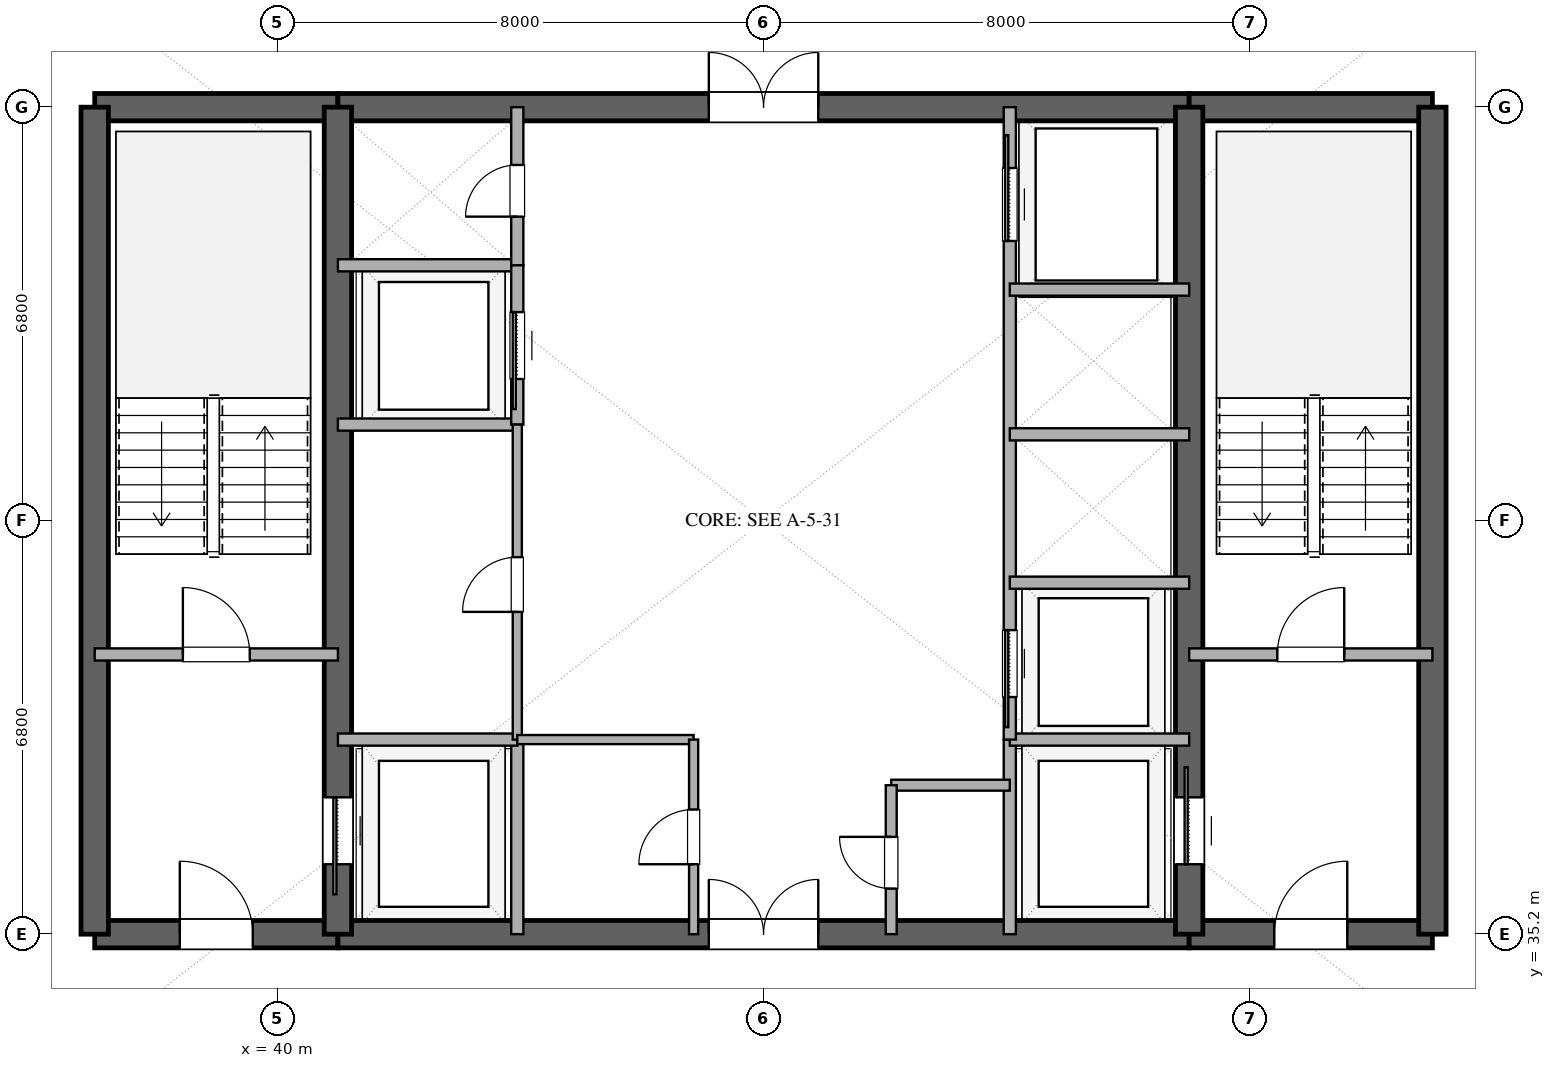
"""IFC4 building model, lengths in metres.
Left out: names, types, materials, properties, quantities, classifications, styles, units other than length and angle.
Written with IfcOpenShell. Run it as: python <this file> out.ifc"""

import sys

from ifc_helpers import new_model, si_unit, direction, frame, frame_2d, origin, place, context, subcontext, project, spatial, rectangle, extrude, element, fill, save


model = new_model("IFC4")
c1 = context("Model", 3, precision=1e-05, world=origin(), true_north=direction((0.0, 1.0)))
c2 = subcontext(c1, "Body", "Model", "MODEL_VIEW")
j1 = project(units=[si_unit("LENGTHUNIT", "METRE"), si_unit("PLANEANGLEUNIT", "RADIAN")], contexts=[c1])
p1 = place(None, origin())
s1 = spatial("IfcSite", under=j1, at=p1, CompositionType="ELEMENT")
p2 = place(p1, origin())
s2 = spatial("IfcBuilding", under=s1, at=p2, CompositionType="ELEMENT")
p3 = place(p2, frame((0.0, 0.0, 206.4)))
s3 = spatial("IfcBuildingStorey", under=s2, at=p3, CompositionType="ELEMENT", Elevation=206.4)
p4 = place(p3, frame((37.0, 35.2, 0.0), z_axis=(0.0, 0.0, 1.0), x_axis=(1.0, 0.0, 0.0)))
e1 = element("IfcWall", 1, at=p4, inside=s3, PredefinedType="SHEAR", context=c2, shape_type="SweptSolid", body=[
    extrude(rectangle(XDim=4.0, YDim=0.45, at=frame_2d((2.0, 0.0))), origin(), (0.0, 0.0, 1.0), 3.36),
])
p5 = place(p4, frame((1.4, 0.0, 0.0)))
e2 = element("IfcOpeningElement", 2, at=p5, cuts=e1, PredefinedType="OPENING", context=c2, shape_type="SweptSolid", body=[
    extrude(rectangle(XDim=1.2, YDim=2.15, at=frame_2d((0.6, 1.075))), frame((0.0, 0.235, 0.0), z_axis=(0.0, -1.0, 0.0), x_axis=(1.0, 0.0, 0.0)), (0.0, 0.0, 1.0), 0.47),
])
p6 = place(p3, frame((41.0, 35.2, 0.0), z_axis=(0.0, 0.0, 1.0), x_axis=(1.0, 0.0, 0.0)))
e3 = element("IfcWall", 3, at=p6, inside=s3, PredefinedType="SHEAR", context=c2, shape_type="SweptSolid", body=[
    extrude(rectangle(XDim=14.0, YDim=0.45, at=frame_2d((7.0, 0.0))), origin(), (0.0, 0.0, 1.0), 3.36),
])
p7 = place(p6, frame((6.1, 0.0, 0.0)))
e4 = element("IfcOpeningElement", 4, at=p7, cuts=e3, PredefinedType="OPENING", context=c2, shape_type="SweptSolid", body=[
    extrude(rectangle(XDim=1.8, YDim=2.25, at=frame_2d((0.9, 1.125))), frame((0.0, 0.235, 0.0), z_axis=(0.0, -1.0, 0.0), x_axis=(1.0, 0.0, 0.0)), (0.0, 0.0, 1.0), 0.47),
])
p8 = place(p3, frame((55.0, 35.2, 0.0), z_axis=(0.0, 0.0, 1.0), x_axis=(1.0, 0.0, 0.0)))
e5 = element("IfcWall", 5, at=p8, inside=s3, PredefinedType="SHEAR", context=c2, shape_type="SweptSolid", body=[
    extrude(rectangle(XDim=4.0, YDim=0.45, at=frame_2d((2.0, 0.0))), origin(), (0.0, 0.0, 1.0), 3.36),
])
p9 = place(p8, frame((1.4, 0.0, 0.0)))
e6 = element("IfcOpeningElement", 6, at=p9, cuts=e5, PredefinedType="OPENING", context=c2, shape_type="SweptSolid", body=[
    extrude(rectangle(XDim=1.2, YDim=2.15, at=frame_2d((0.6, 1.075))), frame((0.0, 0.235, 0.0), z_axis=(0.0, -1.0, 0.0), x_axis=(1.0, 0.0, 0.0)), (0.0, 0.0, 1.0), 0.47),
])
p10 = place(p3, frame((37.0, 48.8, 0.0), z_axis=(0.0, 0.0, 1.0), x_axis=(1.0, 0.0, 0.0)))
e7 = element("IfcWall", 7, at=p10, inside=s3, PredefinedType="SHEAR", context=c2, shape_type="SweptSolid", body=[
    extrude(rectangle(XDim=4.0, YDim=0.45, at=frame_2d((2.0, 0.0))), origin(), (0.0, 0.0, 1.0), 3.36),
])
p11 = place(p3, frame((41.0, 48.8, 0.0), z_axis=(0.0, 0.0, 1.0), x_axis=(1.0, 0.0, 0.0)))
e8 = element("IfcWall", 8, at=p11, inside=s3, PredefinedType="SHEAR", context=c2, shape_type="SweptSolid", body=[
    extrude(rectangle(XDim=14.0, YDim=0.45, at=frame_2d((7.0, 0.0))), origin(), (0.0, 0.0, 1.0), 3.36),
])
p12 = place(p11, frame((6.1, 0.0, 0.0)))
e9 = element("IfcOpeningElement", 9, at=p12, cuts=e8, PredefinedType="OPENING", context=c2, shape_type="SweptSolid", body=[
    extrude(rectangle(XDim=1.8, YDim=2.25, at=frame_2d((0.9, 1.125))), frame((0.0, 0.235, 0.0), z_axis=(0.0, -1.0, 0.0), x_axis=(1.0, 0.0, 0.0)), (0.0, 0.0, 1.0), 0.47),
])
p13 = place(p3, frame((55.0, 48.8, 0.0), z_axis=(0.0, 0.0, 1.0), x_axis=(1.0, 0.0, 0.0)))
e10 = element("IfcWall", 10, at=p13, inside=s3, PredefinedType="SHEAR", context=c2, shape_type="SweptSolid", body=[
    extrude(rectangle(XDim=4.0, YDim=0.45, at=frame_2d((2.0, 0.0))), origin(), (0.0, 0.0, 1.0), 3.36),
])
for number, where, z_axis, x_axis in (
    (11, (37.0, 35.2, 0.0), (0.0, 0.0, 1.0), (0.0, 1.0, 0.0)),
    (12, (59.0, 35.2, 0.0), (0.0, 0.0, 1.0), (0.0, 1.0, 0.0)),
):
    element("IfcWall", number, at=place(p3, frame(where, z_axis=z_axis, x_axis=x_axis)), inside=s3, PredefinedType="SHEAR", context=c2, shape_type="SweptSolid", body=[
        extrude(rectangle(XDim=13.6, YDim=0.45, at=frame_2d((6.8, 0.0))), origin(), (0.0, 0.0, 1.0), 3.36),
    ])
p14 = place(p3, frame((41.0, 35.2, 0.0), z_axis=(0.0, 0.0, 1.0), x_axis=(0.0, 1.0, 0.0)))
e13 = element("IfcWall", 13, at=p14, inside=s3, PredefinedType="SHEAR", context=c2, shape_type="SweptSolid", body=[
    extrude(rectangle(XDim=13.6, YDim=0.45, at=frame_2d((6.8, 0.0))), origin(), (0.0, 0.0, 1.0), 3.36),
])
p15 = place(p14, frame((1.15, 0.0, 0.0)))
e14 = element("IfcOpeningElement", 14, at=p15, cuts=e13, PredefinedType="OPENING", context=c2, shape_type="SweptSolid", body=[
    extrude(rectangle(XDim=1.1, YDim=2.2, at=frame_2d((0.55, 1.1))), frame((0.0, 0.235, 0.0), z_axis=(0.0, -1.0, 0.0), x_axis=(1.0, 0.0, 0.0)), (0.0, 0.0, 1.0), 0.47),
])
p16 = place(p3, frame((55.0, 35.2, 0.0), z_axis=(0.0, 0.0, 1.0), x_axis=(0.0, 1.0, 0.0)))
e15 = element("IfcWall", 15, at=p16, inside=s3, PredefinedType="SHEAR", context=c2, shape_type="SweptSolid", body=[
    extrude(rectangle(XDim=13.6, YDim=0.45, at=frame_2d((6.8, 0.0))), origin(), (0.0, 0.0, 1.0), 3.36),
])
p17 = place(p16, frame((1.15, 0.0, 0.0)))
e16 = element("IfcOpeningElement", 16, at=p17, cuts=e15, PredefinedType="OPENING", context=c2, shape_type="SweptSolid", body=[
    extrude(rectangle(XDim=1.1, YDim=2.2, at=frame_2d((0.55, 1.1))), frame((0.0, 0.235, 0.0), z_axis=(0.0, -1.0, 0.0), x_axis=(1.0, 0.0, 0.0)), (0.0, 0.0, 1.0), 0.47),
])
p18 = place(p3, frame((37.0, 39.8, 0.0), z_axis=(0.0, 0.0, 1.0), x_axis=(1.0, 0.0, 0.0)))
e17 = element("IfcWall", 17, at=p18, inside=s3, PredefinedType="SOLIDWALL", context=c2, shape_type="SweptSolid", body=[
    extrude(rectangle(XDim=4.0, YDim=0.2, at=frame_2d((2.0, 0.0))), origin(), (0.0, 0.0, 1.0), 2.72),
])
p19 = place(p18, frame((1.45, 0.0, 0.0)))
e18 = element("IfcOpeningElement", 18, at=p19, cuts=e17, PredefinedType="OPENING", context=c2, shape_type="SweptSolid", body=[
    extrude(rectangle(XDim=1.1, YDim=2.15, at=frame_2d((0.55, 1.075))), frame((0.0, 0.11, 0.0), z_axis=(0.0, -1.0, 0.0), x_axis=(1.0, 0.0, 0.0)), (0.0, 0.0, 1.0), 0.22),
])
p20 = place(p3, frame((55.0, 39.8, 0.0), z_axis=(0.0, 0.0, 1.0), x_axis=(1.0, 0.0, 0.0)))
e19 = element("IfcWall", 19, at=p20, inside=s3, PredefinedType="SOLIDWALL", context=c2, shape_type="SweptSolid", body=[
    extrude(rectangle(XDim=4.0, YDim=0.2, at=frame_2d((2.0, 0.0))), origin(), (0.0, 0.0, 1.0), 2.72),
])
p21 = place(p20, frame((1.45, 0.0, 0.0)))
e20 = element("IfcOpeningElement", 20, at=p21, cuts=e19, PredefinedType="OPENING", context=c2, shape_type="SweptSolid", body=[
    extrude(rectangle(XDim=1.1, YDim=2.15, at=frame_2d((0.55, 1.075))), frame((0.0, 0.11, 0.0), z_axis=(0.0, -1.0, 0.0), x_axis=(1.0, 0.0, 0.0)), (0.0, 0.0, 1.0), 0.22),
])
p22 = place(p3, frame((43.95, 35.2, 0.0), z_axis=(0.0, 0.0, 1.0), x_axis=(0.0, 1.0, 0.0)))
e21 = element("IfcWall", 21, at=p22, inside=s3, PredefinedType="SOLIDWALL", context=c2, shape_type="SweptSolid", body=[
    extrude(rectangle(XDim=3.2, YDim=0.2, at=frame_2d((1.6, 0.0))), origin(), (0.0, 0.0, 1.0), 2.72),
])
p23 = place(p3, frame((41.0, 38.4, 0.0), z_axis=(0.0, 0.0, 1.0), x_axis=(1.0, 0.0, 0.0)))
e22 = element("IfcWall", 22, at=p23, inside=s3, PredefinedType="SOLIDWALL", context=c2, shape_type="SweptSolid", body=[
    extrude(rectangle(XDim=2.95, YDim=0.2, at=frame_2d((1.475, 0.0))), origin(), (0.0, 0.0, 1.0), 2.72),
])
p24 = place(p3, frame((52.05, 35.2, 0.0), z_axis=(0.0, 0.0, 1.0), x_axis=(0.0, 1.0, 0.0)))
e23 = element("IfcWall", 23, at=p24, inside=s3, PredefinedType="SOLIDWALL", context=c2, shape_type="SweptSolid", body=[
    extrude(rectangle(XDim=3.2, YDim=0.2, at=frame_2d((1.6, 0.0))), origin(), (0.0, 0.0, 1.0), 2.72),
])
for number, where, z_axis, x_axis in (
    (24, (52.05, 38.4, 0.0), (0.0, 0.0, 1.0), (1.0, 0.0, 0.0)),
    (25, (41.0, 46.2, 0.0), (0.0, 0.0, 1.0), (1.0, 0.0, 0.0)),
):
    element("IfcWall", number, at=place(p3, frame(where, z_axis=z_axis, x_axis=x_axis)), inside=s3, PredefinedType="SOLIDWALL", context=c2, shape_type="SweptSolid", body=[
        extrude(rectangle(XDim=2.95, YDim=0.2, at=frame_2d((1.475, 0.0))), origin(), (0.0, 0.0, 1.0), 2.72),
    ])
p25 = place(p3, frame((43.95, 46.2, 0.0), z_axis=(0.0, 0.0, 1.0), x_axis=(0.0, 1.0, 0.0)))
e26 = element("IfcWall", 26, at=p25, inside=s3, PredefinedType="SOLIDWALL", context=c2, shape_type="SweptSolid", body=[
    extrude(rectangle(XDim=2.6, YDim=0.2, at=frame_2d((1.3, 0.0))), origin(), (0.0, 0.0, 1.0), 2.72),
])
p26 = place(p25, frame((0.8, 0.0, 0.0)))
e27 = element("IfcOpeningElement", 27, at=p26, cuts=e26, PredefinedType="OPENING", context=c2, shape_type="SweptSolid", body=[
    extrude(rectangle(XDim=0.85, YDim=2.15, at=frame_2d((0.425, 1.075))), frame((0.0, 0.11, 0.0), z_axis=(0.0, -1.0, 0.0), x_axis=(1.0, 0.0, 0.0)), (0.0, 0.0, 1.0), 0.22),
])
p27 = place(p3, frame((41.0, 43.58, 0.0), z_axis=(0.0, 0.0, 1.0), x_axis=(1.0, 0.0, 0.0)))
e28 = element("IfcWall", 28, at=p27, inside=s3, PredefinedType="SOLIDWALL", context=c2, shape_type="SweptSolid", body=[
    extrude(rectangle(XDim=2.95, YDim=0.2, at=frame_2d((1.475, 0.0))), origin(), (0.0, 0.0, 1.0), 2.72),
])
p28 = place(p3, frame((43.95, 43.58, 0.0), z_axis=(0.0, 0.0, 1.0), x_axis=(0.0, 1.0, 0.0)))
e29 = element("IfcWall", 29, at=p28, inside=s3, PredefinedType="SOLIDWALL", context=c2, shape_type="SweptSolid", body=[
    extrude(rectangle(XDim=2.62, YDim=0.2, at=frame_2d((1.31, 0.0))), origin(), (0.0, 0.0, 1.0), 2.72),
])
p29 = place(p28, frame((0.75, 0.0, 0.0)))
e30 = element("IfcOpeningElement", 30, at=p29, cuts=e29, PredefinedType="OPENING", context=c2, shape_type="SweptSolid", body=[
    extrude(rectangle(XDim=1.1, YDim=2.2, at=frame_2d((0.55, 1.1))), frame((0.0, 0.11, 0.0), z_axis=(0.0, -1.0, 0.0), x_axis=(1.0, 0.0, 0.0)), (0.0, 0.0, 1.0), 0.22),
])
p30 = place(p3, frame((43.95, 38.4, 0.0), z_axis=(0.0, 0.0, 1.0), x_axis=(0.0, 1.0, 0.0)))
e31 = element("IfcWall", 31, at=p30, inside=s3, PredefinedType="PARTITIONING", context=c2, shape_type="SweptSolid", body=[
    extrude(rectangle(XDim=5.18, YDim=0.15, at=frame_2d((2.59, 0.0))), origin(), (0.0, 0.0, 1.0), 2.72),
])
p31 = place(p30, frame((2.1, 0.0, 0.0)))
e32 = element("IfcOpeningElement", 32, at=p31, cuts=e31, PredefinedType="OPENING", context=c2, shape_type="SweptSolid", body=[
    extrude(rectangle(XDim=0.9, YDim=2.15, at=frame_2d((0.45, 1.075))), frame((0.0, 0.085, 0.0), z_axis=(0.0, -1.0, 0.0), x_axis=(1.0, 0.0, 0.0)), (0.0, 0.0, 1.0), 0.17),
])
p32 = place(p3, frame((52.05, 38.4, 0.0), z_axis=(0.0, 0.0, 1.0), x_axis=(0.0, 1.0, 0.0)))
e33 = element("IfcWall", 33, at=p32, inside=s3, PredefinedType="SOLIDWALL", context=c2, shape_type="SweptSolid", body=[
    extrude(rectangle(XDim=10.4, YDim=0.2, at=frame_2d((5.2, 0.0))), origin(), (0.0, 0.0, 1.0), 2.72),
])
p33 = place(p32, frame((0.7, 0.0, 0.0)))
e34 = element("IfcOpeningElement", 34, at=p33, cuts=e33, PredefinedType="OPENING", context=c2, shape_type="SweptSolid", body=[
    extrude(rectangle(XDim=1.1, YDim=2.2, at=frame_2d((0.55, 1.1))), frame((0.0, 0.11, 0.0), z_axis=(0.0, -1.0, 0.0), x_axis=(1.0, 0.0, 0.0)), (0.0, 0.0, 1.0), 0.22),
])
p34 = place(p32, frame((8.2, 0.0, 0.0)))
e35 = element("IfcOpeningElement", 35, at=p34, cuts=e33, PredefinedType="OPENING", context=c2, shape_type="SweptSolid", body=[
    extrude(rectangle(XDim=1.2, YDim=2.2, at=frame_2d((0.6, 1.1))), frame((0.0, 0.11, 0.0), z_axis=(0.0, -1.0, 0.0), x_axis=(1.0, 0.0, 0.0)), (0.0, 0.0, 1.0), 0.22),
])
for number, where, z_axis, x_axis in (
    (36, (52.05, 40.98, 0.0), (0.0, 0.0, 1.0), (1.0, 0.0, 0.0)),
    (37, (52.05, 43.42, 0.0), (0.0, 0.0, 1.0), (1.0, 0.0, 0.0)),
    (38, (52.05, 45.8, 0.0), (0.0, 0.0, 1.0), (1.0, 0.0, 0.0)),
):
    element("IfcWall", number, at=place(p3, frame(where, z_axis=z_axis, x_axis=x_axis)), inside=s3, PredefinedType="SOLIDWALL", context=c2, shape_type="SweptSolid", body=[
        extrude(rectangle(XDim=2.95, YDim=0.2, at=frame_2d((1.475, 0.0))), origin(), (0.0, 0.0, 1.0), 2.72),
    ])
p35 = place(p3, frame((43.95, 38.4, 0.0), z_axis=(0.0, 0.0, 1.0), x_axis=(1.0, 0.0, 0.0)))
e39 = element("IfcWall", 39, at=p35, inside=s3, PredefinedType="PARTITIONING", context=c2, shape_type="SweptSolid", body=[
    extrude(rectangle(XDim=2.9, YDim=0.15, at=frame_2d((1.45, 0.0))), origin(), (0.0, 0.0, 1.0), 2.72),
])
p36 = place(p3, frame((46.85, 35.2, 0.0), z_axis=(0.0, 0.0, 1.0), x_axis=(0.0, 1.0, 0.0)))
e40 = element("IfcWall", 40, at=p36, inside=s3, PredefinedType="PARTITIONING", context=c2, shape_type="SweptSolid", body=[
    extrude(rectangle(XDim=3.2, YDim=0.15, at=frame_2d((1.6, 0.0))), origin(), (0.0, 0.0, 1.0), 2.72),
])
p37 = place(p36, frame((1.15, 0.0, 0.0)))
e41 = element("IfcOpeningElement", 41, at=p37, cuts=e40, PredefinedType="OPENING", context=c2, shape_type="SweptSolid", body=[
    extrude(rectangle(XDim=0.9, YDim=2.15, at=frame_2d((0.45, 1.075))), frame((0.0, 0.085, 0.0), z_axis=(0.0, -1.0, 0.0), x_axis=(1.0, 0.0, 0.0)), (0.0, 0.0, 1.0), 0.17),
])
p38 = place(p3, frame((50.1, 37.65, 0.0), z_axis=(0.0, 0.0, 1.0), x_axis=(1.0, 0.0, 0.0)))
e42 = element("IfcWall", 42, at=p38, inside=s3, PredefinedType="PLUMBINGWALL", context=c2, shape_type="SweptSolid", body=[
    extrude(rectangle(XDim=1.95, YDim=0.18, at=frame_2d((0.975, 0.0))), origin(), (0.0, 0.0, 1.0), 2.72),
])
p39 = place(p3, frame((50.1, 35.2, 0.0), z_axis=(0.0, 0.0, 1.0), x_axis=(0.0, 1.0, 0.0)))
e43 = element("IfcWall", 43, at=p39, inside=s3, PredefinedType="PLUMBINGWALL", context=c2, shape_type="SweptSolid", body=[
    extrude(rectangle(XDim=2.45, YDim=0.18, at=frame_2d((1.225, 0.0))), origin(), (0.0, 0.0, 1.0), 2.72),
])
p40 = place(p39, frame((0.75, 0.0, 0.0)))
e44 = element("IfcOpeningElement", 44, at=p40, cuts=e43, PredefinedType="OPENING", context=c2, shape_type="SweptSolid", body=[
    extrude(rectangle(XDim=0.85, YDim=2.1, at=frame_2d((0.425, 1.05))), frame((0.0, 0.1, 0.0), z_axis=(0.0, -1.0, 0.0), x_axis=(1.0, 0.0, 0.0)), (0.0, 0.0, 1.0), 0.2),
])
p41 = place(p15, origin())
e45 = element("IfcDoor", 45, at=p41, inside=s3, OperationType="SLIDING_TO_LEFT", PredefinedType="DOOR", context=c2, shape_type="SweptSolid", body=[
    extrude(rectangle(XDim=1.1, YDim=2.2, at=frame_2d((0.55, 1.1))), frame((0.0, 0.025, 0.0), z_axis=(0.0, -1.0, 0.0), x_axis=(1.0, 0.0, 0.0)), (0.0, 0.0, 1.0), 0.05),
])
fill(e14, e45)
p42 = place(p17, origin())
e46 = element("IfcDoor", 46, at=p42, inside=s3, OperationType="SLIDING_TO_RIGHT", PredefinedType="DOOR", context=c2, shape_type="SweptSolid", body=[
    extrude(rectangle(XDim=1.1, YDim=2.2, at=frame_2d((0.55, 1.1))), frame((0.0, 0.025, 0.0), z_axis=(0.0, -1.0, 0.0), x_axis=(1.0, 0.0, 0.0)), (0.0, 0.0, 1.0), 0.05),
])
fill(e16, e46)
p43 = place(p5, origin())
e47 = element("IfcDoor", 47, at=p43, inside=s3, OperationType="SINGLE_SWING_LEFT", PredefinedType="DOOR", context=c2, shape_type="SweptSolid", body=[
    extrude(rectangle(XDim=1.2, YDim=2.15, at=frame_2d((0.6, 1.075))), frame((0.0, 0.025, 0.0), z_axis=(0.0, -1.0, 0.0), x_axis=(1.0, 0.0, 0.0)), (0.0, 0.0, 1.0), 0.05),
])
fill(e2, e47)
p44 = place(p9, origin())
e48 = element("IfcDoor", 48, at=p44, inside=s3, OperationType="SINGLE_SWING_RIGHT", PredefinedType="DOOR", context=c2, shape_type="SweptSolid", body=[
    extrude(rectangle(XDim=1.2, YDim=2.15, at=frame_2d((0.6, 1.075))), frame((0.0, 0.025, 0.0), z_axis=(0.0, -1.0, 0.0), x_axis=(1.0, 0.0, 0.0)), (0.0, 0.0, 1.0), 0.05),
])
fill(e6, e48)
p45 = place(p7, origin())
e49 = element("IfcDoor", 49, at=p45, inside=s3, OperationType="DOUBLE_DOOR_SINGLE_SWING", PredefinedType="DOOR", context=c2, shape_type="SweptSolid", body=[
    extrude(rectangle(XDim=1.8, YDim=2.25, at=frame_2d((0.9, 1.125))), frame((0.0, 0.025, 0.0), z_axis=(0.0, -1.0, 0.0), x_axis=(1.0, 0.0, 0.0)), (0.0, 0.0, 1.0), 0.05),
])
fill(e4, e49)
p46 = place(p12, origin())
e50 = element("IfcDoor", 50, at=p46, inside=s3, OperationType="DOUBLE_DOOR_SINGLE_SWING", PredefinedType="DOOR", context=c2, shape_type="SweptSolid", body=[
    extrude(rectangle(XDim=1.8, YDim=2.25, at=frame_2d((0.9, 1.125))), frame((0.0, 0.025, 0.0), z_axis=(0.0, -1.0, 0.0), x_axis=(1.0, 0.0, 0.0)), (0.0, 0.0, 1.0), 0.05),
])
fill(e9, e50)
p47 = place(p19, origin())
e51 = element("IfcDoor", 51, at=p47, inside=s3, OperationType="SINGLE_SWING_LEFT", PredefinedType="DOOR", context=c2, shape_type="SweptSolid", body=[
    extrude(rectangle(XDim=1.1, YDim=2.15, at=frame_2d((0.55, 1.075))), frame((0.0, 0.025, 0.0), z_axis=(0.0, -1.0, 0.0), x_axis=(1.0, 0.0, 0.0)), (0.0, 0.0, 1.0), 0.05),
])
fill(e18, e51)
p48 = place(p21, origin())
e52 = element("IfcDoor", 52, at=p48, inside=s3, OperationType="SINGLE_SWING_RIGHT", PredefinedType="DOOR", context=c2, shape_type="SweptSolid", body=[
    extrude(rectangle(XDim=1.1, YDim=2.15, at=frame_2d((0.55, 1.075))), frame((0.0, 0.025, 0.0), z_axis=(0.0, -1.0, 0.0), x_axis=(1.0, 0.0, 0.0)), (0.0, 0.0, 1.0), 0.05),
])
fill(e20, e52)
p49 = place(p26, origin())
e53 = element("IfcDoor", 53, at=p49, inside=s3, OperationType="SINGLE_SWING_LEFT", PredefinedType="DOOR", context=c2, shape_type="SweptSolid", body=[
    extrude(rectangle(XDim=0.85, YDim=2.15, at=frame_2d((0.425, 1.075))), frame((0.0, 0.025, 0.0), z_axis=(0.0, -1.0, 0.0), x_axis=(1.0, 0.0, 0.0)), (0.0, 0.0, 1.0), 0.05),
])
fill(e27, e53)
p50 = place(p29, origin())
e54 = element("IfcDoor", 54, at=p50, inside=s3, OperationType="SLIDING_TO_LEFT", PredefinedType="DOOR", context=c2, shape_type="SweptSolid", body=[
    extrude(rectangle(XDim=1.1, YDim=2.2, at=frame_2d((0.55, 1.1))), frame((0.0, 0.025, 0.0), z_axis=(0.0, -1.0, 0.0), x_axis=(1.0, 0.0, 0.0)), (0.0, 0.0, 1.0), 0.05),
])
fill(e30, e54)
p51 = place(p31, origin())
e55 = element("IfcDoor", 55, at=p51, inside=s3, OperationType="SINGLE_SWING_LEFT", PredefinedType="DOOR", context=c2, shape_type="SweptSolid", body=[
    extrude(rectangle(XDim=0.9, YDim=2.15, at=frame_2d((0.45, 1.075))), frame((0.0, 0.025, 0.0), z_axis=(0.0, -1.0, 0.0), x_axis=(1.0, 0.0, 0.0)), (0.0, 0.0, 1.0), 0.05),
])
fill(e32, e55)
p52 = place(p33, origin())
e56 = element("IfcDoor", 56, at=p52, inside=s3, OperationType="SLIDING_TO_LEFT", PredefinedType="DOOR", context=c2, shape_type="SweptSolid", body=[
    extrude(rectangle(XDim=1.1, YDim=2.2, at=frame_2d((0.55, 1.1))), frame((0.0, 0.025, 0.0), z_axis=(0.0, -1.0, 0.0), x_axis=(1.0, 0.0, 0.0)), (0.0, 0.0, 1.0), 0.05),
])
fill(e34, e56)
p53 = place(p34, origin())
e57 = element("IfcDoor", 57, at=p53, inside=s3, OperationType="SLIDING_TO_RIGHT", PredefinedType="DOOR", context=c2, shape_type="SweptSolid", body=[
    extrude(rectangle(XDim=1.2, YDim=2.2, at=frame_2d((0.6, 1.1))), frame((0.0, 0.025, 0.0), z_axis=(0.0, -1.0, 0.0), x_axis=(1.0, 0.0, 0.0)), (0.0, 0.0, 1.0), 0.05),
])
fill(e35, e57)
p54 = place(p37, origin())
e58 = element("IfcDoor", 58, at=p54, inside=s3, OperationType="SINGLE_SWING_LEFT", PredefinedType="DOOR", context=c2, shape_type="SweptSolid", body=[
    extrude(rectangle(XDim=0.9, YDim=2.15, at=frame_2d((0.45, 1.075))), frame((0.0, 0.025, 0.0), z_axis=(0.0, -1.0, 0.0), x_axis=(1.0, 0.0, 0.0)), (0.0, 0.0, 1.0), 0.05),
])
fill(e41, e58)
p55 = place(p40, origin())
e59 = element("IfcDoor", 59, at=p55, inside=s3, OperationType="SINGLE_SWING_RIGHT", PredefinedType="DOOR", context=c2, shape_type="SweptSolid", body=[
    extrude(rectangle(XDim=0.85, YDim=2.1, at=frame_2d((0.425, 1.05))), frame((0.0, 0.025, 0.0), z_axis=(0.0, -1.0, 0.0), x_axis=(1.0, 0.0, 0.0)), (0.0, 0.0, 1.0), 0.05),
])
fill(e44, e59)
save(model, sys.argv[1])
